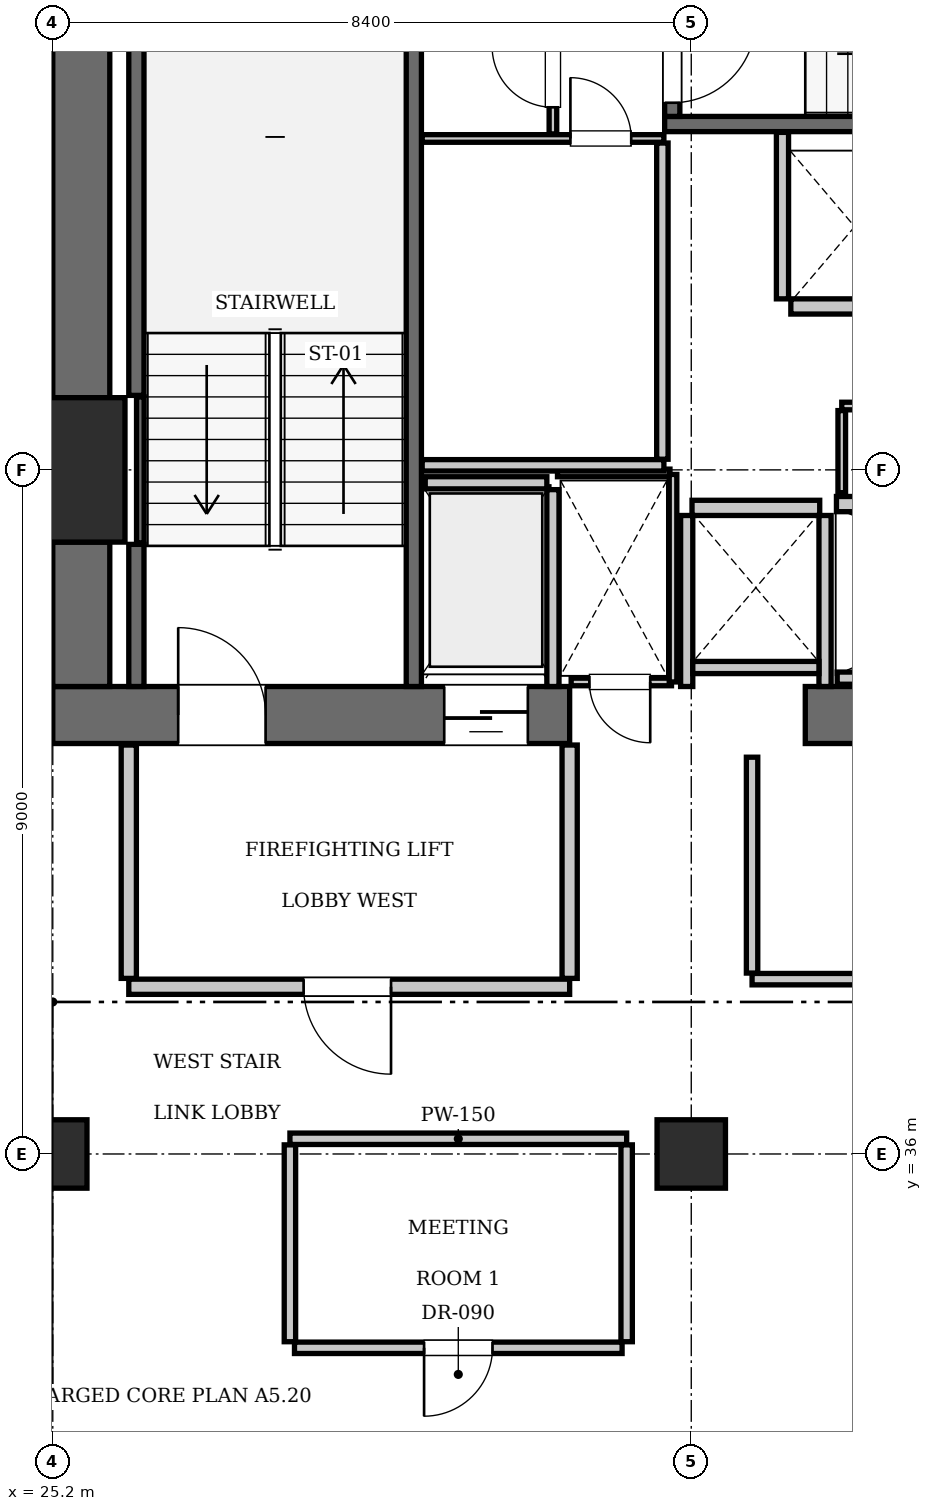
"""IFC4 building model, lengths in metres.
Left out: names, types, materials, properties, quantities, classifications, styles, units other than length and angle.
Written with IfcOpenShell. Run it as: python <this file> out.ifc"""

import sys

from ifc_helpers import new_model, si_unit, direction, frame, frame_2d, origin, origin_2d, place, context, subcontext, project, spatial, rectangle, extrude, element, fill, save


model = new_model("IFC4")
c1 = context("Model", 3, precision=1e-05, world=origin(), true_north=direction((0.0, 1.0)))
c2 = subcontext(c1, "Body", "Model", "MODEL_VIEW")
j1 = project(units=[si_unit("LENGTHUNIT", "METRE"), si_unit("PLANEANGLEUNIT", "RADIAN")], contexts=[c1])
p1 = place(None, origin())
s1 = spatial("IfcSite", under=j1, at=p1, CompositionType="ELEMENT")
p2 = place(p1, origin())
s2 = spatial("IfcBuilding", under=s1, at=p2, CompositionType="ELEMENT")
p3 = place(p2, frame((0.0, 0.0, 173.6)))
s3 = spatial("IfcBuildingStorey", under=s2, at=p3, CompositionType="ELEMENT", Elevation=173.6)
p4 = place(p3, frame((25.2, 45.0, 0.0), z_axis=(0.0, 0.0, 1.0), x_axis=(1.0, 0.0, 0.0)))
e1 = element("IfcColumn", 1, at=p4, inside=s3, PredefinedType="COLUMN", context=c2, shape_type="SweptSolid", body=[
    extrude(rectangle(XDim=1.9, YDim=1.9, at=origin_2d()), origin(), (0.0, 0.0, 1.0), 3.85),
])
p5 = place(p3, frame((25.2, 41.775, 0.0), z_axis=(0.0, 0.0, 1.0), x_axis=(1.0, 0.0, 0.0)))
e2 = element("IfcWall", 2, at=p5, inside=s3, PredefinedType="SHEAR", context=c2, shape_type="SweptSolid", body=[
    extrude(rectangle(XDim=6.8, YDim=0.75, at=frame_2d((3.4, 0.0))), origin(), (0.0, 0.0, 1.0), 3.85),
])
p6 = place(p5, frame((1.65, 0.0, 0.0)))
e3 = element("IfcOpeningElement", 3, at=p6, cuts=e2, PredefinedType="OPENING", context=c2, shape_type="SweptSolid", body=[
    extrude(rectangle(XDim=1.15, YDim=2.15, at=frame_2d((0.575, 1.075))), frame((0.0, 0.385, 0.0), z_axis=(0.0, -1.0, 0.0), x_axis=(1.0, 0.0, 0.0)), (0.0, 0.0, 1.0), 0.77),
])
p7 = place(p5, frame((5.15, 0.0, 0.0)))
e4 = element("IfcOpeningElement", 4, at=p7, cuts=e2, PredefinedType="OPENING", context=c2, shape_type="SweptSolid", body=[
    extrude(rectangle(XDim=1.1, YDim=2.2, at=frame_2d((0.55, 1.1))), frame((0.0, 0.385, 0.0), z_axis=(0.0, -1.0, 0.0), x_axis=(1.0, 0.0, 0.0)), (0.0, 0.0, 1.0), 0.77),
])
p8 = place(p3, frame((35.1, 41.775, 0.0), z_axis=(0.0, 0.0, 1.0), x_axis=(1.0, 0.0, 0.0)))
e5 = element("IfcWall", 5, at=p8, inside=s3, PredefinedType="SHEAR", context=c2, shape_type="SweptSolid", body=[
    extrude(rectangle(XDim=5.4, YDim=0.75, at=frame_2d((2.7, 0.0))), origin(), (0.0, 0.0, 1.0), 3.85),
])
p9 = place(p3, frame((25.575, 42.15, 0.0), z_axis=(0.0, 0.0, 1.0), x_axis=(0.0, 1.0, 0.0)))
e6 = element("IfcWall", 6, at=p9, inside=s3, PredefinedType="SHEAR", context=c2, shape_type="SweptSolid", body=[
    extrude(rectangle(XDim=1.9, YDim=0.75, at=frame_2d((0.95, 0.0))), origin(), (0.0, 0.0, 1.0), 3.85),
])
p10 = place(p3, frame((25.575, 45.95, 0.0), z_axis=(0.0, 0.0, 1.0), x_axis=(0.0, 1.0, 0.0)))
e7 = element("IfcWall", 7, at=p10, inside=s3, PredefinedType="SHEAR", context=c2, shape_type="SweptSolid", body=[
    extrude(rectangle(XDim=7.3, YDim=0.75, at=frame_2d((3.65, 0.0))), origin(), (0.0, 0.0, 1.0), 3.85),
])
for number, where, z_axis, x_axis in (
    (8, (25.2, 36.0, 0.0), (0.0, 0.0, 1.0), (1.0, 0.0, 0.0)),
    (9, (33.6, 36.0, 0.0), (0.0, 0.0, 1.0), (1.0, 0.0, 0.0)),
):
    element("IfcColumn", number, at=place(p3, frame(where, z_axis=z_axis, x_axis=x_axis)), inside=s3, PredefinedType="COLUMN", context=c2, shape_type="SweptSolid", body=[
        extrude(rectangle(XDim=0.9, YDim=0.9, at=origin_2d()), origin(), (0.0, 0.0, 1.0), 3.85),
    ])
p11 = place(p3, frame((29.95, 42.15, 0.0), z_axis=(0.0, 0.0, 1.0), x_axis=(0.0, 1.0, 0.0)))
e10 = element("IfcWall", 10, at=p11, inside=s3, PredefinedType="SOLIDWALL", context=c2, shape_type="SweptSolid", body=[
    extrude(rectangle(XDim=9.0, YDim=0.2, at=frame_2d((4.5, 0.0))), origin(), (0.0, 0.0, 1.0), 3.61),
])
p12 = place(p3, frame((26.3, 42.15, 0.0), z_axis=(0.0, 0.0, 1.0), x_axis=(0.0, 1.0, 0.0)))
e11 = element("IfcWall", 11, at=p12, inside=s3, PredefinedType="SOLIDWALL", context=c2, shape_type="SweptSolid", body=[
    extrude(rectangle(XDim=1.87, YDim=0.2, at=frame_2d((0.935, 0.0))), origin(), (0.0, 0.0, 1.0), 3.61),
])
p13 = place(p3, frame((26.3, 45.98, 0.0), z_axis=(0.0, 0.0, 1.0), x_axis=(0.0, 1.0, 0.0)))
e12 = element("IfcWall", 12, at=p13, inside=s3, PredefinedType="SOLIDWALL", context=c2, shape_type="SweptSolid", body=[
    extrude(rectangle(XDim=5.14, YDim=0.2, at=frame_2d((2.57, 0.0))), origin(), (0.0, 0.0, 1.0), 3.61),
])
p14 = place(p3, frame((26.352, 44.04, 0.0), z_axis=(0.0, 0.0, 1.0), x_axis=(0.0, 1.0, 0.0)))
e13 = element("IfcWall", 13, at=p14, inside=s3, PredefinedType="SOLIDWALL", context=c2, shape_type="SweptSolid", body=[
    extrude(rectangle(XDim=1.92, YDim=0.1, at=frame_2d((0.96, 0.0))), origin(), (0.0, 0.0, 1.0), 3.61),
])
p15 = place(p3, frame((33.25, 49.55, 0.0), z_axis=(0.0, 0.0, 1.0), x_axis=(1.0, 0.0, 0.0)))
e14 = element("IfcWall", 14, at=p15, inside=s3, PredefinedType="SOLIDWALL", context=c2, shape_type="SweptSolid", body=[
    extrude(rectangle(XDim=9.1, YDim=0.2, at=frame_2d((4.55, 0.0))), origin(), (0.0, 0.0, 1.0), 3.61),
])
p16 = place(p3, frame((33.35, 49.65, 0.0), z_axis=(0.0, 0.0, 1.0), x_axis=(0.0, 1.0, 0.0)))
e15 = element("IfcWall", 15, at=p16, inside=s3, PredefinedType="SOLIDWALL", context=c2, shape_type="SweptSolid", body=[
    extrude(rectangle(XDim=3.6, YDim=0.2, at=frame_2d((1.8, 0.0))), origin(), (0.0, 0.0, 1.0), 3.61),
])
p17 = place(p16, frame((0.18, 0.0, 0.0)))
e16 = element("IfcOpeningElement", 16, at=p17, cuts=e15, PredefinedType="OPENING", context=c2, shape_type="SweptSolid", body=[
    extrude(rectangle(XDim=1.1, YDim=2.15, at=frame_2d((0.55, 1.075))), frame((0.0, 0.11, 0.0), z_axis=(0.0, -1.0, 0.0), x_axis=(1.0, 0.0, 0.0)), (0.0, 0.0, 1.0), 0.22),
])
p18 = place(p3, frame((35.51, 44.55, 0.0), z_axis=(0.0, 0.0, 1.0), x_axis=(1.0, 0.0, 0.0)))
e17 = element("IfcWall", 17, at=p18, inside=s3, PredefinedType="SOLIDWALL", context=c2, shape_type="SweptSolid", body=[
    extrude(rectangle(XDim=1.68, YDim=0.2, at=frame_2d((0.84, 0.0))), origin(), (0.0, 0.0, 1.0), 3.61),
])
p19 = place(p3, frame((34.91, 47.15, 0.0), z_axis=(0.0, 0.0, 1.0), x_axis=(1.0, 0.0, 0.0)))
e18 = element("IfcWall", 18, at=p19, inside=s3, PredefinedType="SOLIDWALL", context=c2, shape_type="SweptSolid", body=[
    extrude(rectangle(XDim=1.68, YDim=0.2, at=frame_2d((0.84, 0.0))), origin(), (0.0, 0.0, 1.0), 3.61),
])
p20 = place(p3, frame((33.61, 44.5, 0.0), z_axis=(0.0, 0.0, 1.0), x_axis=(1.0, 0.0, 0.0)))
e19 = element("IfcWall", 19, at=p20, inside=s3, PredefinedType="SOLIDWALL", context=c2, shape_type="SweptSolid", body=[
    extrude(rectangle(XDim=1.68, YDim=0.2, at=frame_2d((0.84, 0.0))), origin(), (0.0, 0.0, 1.0), 3.61),
])
p21 = place(p3, frame((30.1, 44.83, 0.0), z_axis=(0.0, 0.0, 1.0), x_axis=(1.0, 0.0, 0.0)))
e20 = element("IfcWall", 20, at=p21, inside=s3, PredefinedType="SOLIDWALL", context=c2, shape_type="SweptSolid", body=[
    extrude(rectangle(XDim=1.6, YDim=0.16, at=frame_2d((0.8, 0.0))), origin(), (0.0, 0.0, 1.0), 3.61),
])
p22 = place(p3, frame((31.78, 42.15, 0.0), z_axis=(0.0, 0.0, 1.0), x_axis=(0.0, 1.0, 0.0)))
e21 = element("IfcWall", 21, at=p22, inside=s3, PredefinedType="SOLIDWALL", context=c2, shape_type="SweptSolid", body=[
    extrude(rectangle(XDim=2.59, YDim=0.16, at=frame_2d((1.295, 0.0))), origin(), (0.0, 0.0, 1.0), 3.61),
])
p23 = place(p3, frame((35.52, 42.26, 0.0), z_axis=(0.0, 0.0, 1.0), x_axis=(1.0, 0.0, 0.0)))
e22 = element("IfcWall", 22, at=p23, inside=s3, PredefinedType="SOLIDWALL", context=c2, shape_type="SweptSolid", body=[
    extrude(rectangle(XDim=5.02, YDim=0.16, at=frame_2d((2.51, 0.0))), origin(), (0.0, 0.0, 1.0), 3.61),
])
p24 = place(p3, frame((34.8, 47.25, 0.0), z_axis=(0.0, 0.0, 1.0), x_axis=(0.0, 1.0, 0.0)))
e23 = element("IfcWall", 23, at=p24, inside=s3, PredefinedType="SOLIDWALL", context=c2, shape_type="SweptSolid", body=[
    extrude(rectangle(XDim=2.19, YDim=0.16, at=frame_2d((1.095, 0.0))), origin(), (0.0, 0.0, 1.0), 3.61),
])
for number, where, z_axis, x_axis in (
    (24, (33.54, 42.15, 0.0), (0.0, 0.0, 1.0), (0.0, 1.0, 0.0)),
    (25, (35.36, 42.15, 0.0), (0.0, 0.0, 1.0), (0.0, 1.0, 0.0)),
):
    element("IfcWall", number, at=place(p3, frame(where, z_axis=z_axis, x_axis=x_axis)), inside=s3, PredefinedType="SOLIDWALL", context=c2, shape_type="SweptSolid", body=[
        extrude(rectangle(XDim=2.25, YDim=0.16, at=frame_2d((1.125, 0.0))), origin(), (0.0, 0.0, 1.0), 3.61),
    ])
p25 = place(p3, frame((33.62, 42.4, 0.0), z_axis=(0.0, 0.0, 1.0), x_axis=(1.0, 0.0, 0.0)))
e26 = element("IfcWall", 26, at=p25, inside=s3, PredefinedType="SOLIDWALL", context=c2, shape_type="SweptSolid", body=[
    extrude(rectangle(XDim=1.66, YDim=0.16, at=frame_2d((0.83, 0.0))), origin(), (0.0, 0.0, 1.0), 3.61),
])
p26 = place(p3, frame((26.2, 38.2, 0.0), z_axis=(0.0, 0.0, 1.0), x_axis=(1.0, 0.0, 0.0)))
e27 = element("IfcWall", 27, at=p26, inside=s3, PredefinedType="PARTITIONING", context=c2, shape_type="SweptSolid", body=[
    extrude(rectangle(XDim=5.8, YDim=0.2, at=frame_2d((2.9, 0.0))), origin(), (0.0, 0.0, 1.0), 3.61),
])
p27 = place(p26, frame((2.3, 0.0, 0.0)))
e28 = element("IfcOpeningElement", 28, at=p27, cuts=e27, PredefinedType="OPENING", context=c2, shape_type="SweptSolid", body=[
    extrude(rectangle(XDim=1.15, YDim=2.15, at=frame_2d((0.575, 1.075))), frame((0.0, 0.11, 0.0), z_axis=(0.0, -1.0, 0.0), x_axis=(1.0, 0.0, 0.0)), (0.0, 0.0, 1.0), 0.22),
])
for number, where, z_axis, x_axis in (
    (29, (26.2, 38.31, 0.0), (0.0, 0.0, 1.0), (0.0, 1.0, 0.0)),
    (30, (32.0, 38.31, 0.0), (0.0, 0.0, 1.0), (0.0, 1.0, 0.0)),
):
    element("IfcWall", number, at=place(p3, frame(where, z_axis=z_axis, x_axis=x_axis)), inside=s3, PredefinedType="PARTITIONING", context=c2, shape_type="SweptSolid", body=[
        extrude(rectangle(XDim=3.07, YDim=0.2, at=frame_2d((1.535, 0.0))), origin(), (0.0, 0.0, 1.0), 3.61),
    ])
p28 = place(p3, frame((32.02, 42.21, 0.0), z_axis=(0.0, 0.0, 1.0), x_axis=(1.0, 0.0, 0.0)))
e31 = element("IfcWall", 31, at=p28, inside=s3, PredefinedType="PARTITIONING", context=c2, shape_type="SweptSolid", body=[
    extrude(rectangle(XDim=1.32, YDim=0.1, at=frame_2d((0.66, 0.0))), origin(), (0.0, 0.0, 1.0), 3.61),
])
p29 = place(p28, frame((0.24, 0.0, 0.0)))
e32 = element("IfcOpeningElement", 32, at=p29, cuts=e31, PredefinedType="OPENING", context=c2, shape_type="SweptSolid", body=[
    extrude(rectangle(XDim=0.8, YDim=2.05, at=frame_2d((0.4, 1.025))), frame((0.0, 0.06, 0.0), z_axis=(0.0, -1.0, 0.0), x_axis=(1.0, 0.0, 0.0)), (0.0, 0.0, 1.0), 0.12),
])
p30 = place(p3, frame((31.84, 44.96, 0.0), z_axis=(0.0, 0.0, 1.0), x_axis=(1.0, 0.0, 0.0)))
e33 = element("IfcWall", 33, at=p30, inside=s3, PredefinedType="PARTITIONING", context=c2, shape_type="SweptSolid", body=[
    extrude(rectangle(XDim=1.48, YDim=0.1, at=frame_2d((0.74, 0.0))), origin(), (0.0, 0.0, 1.0), 3.61),
])
p31 = place(p3, frame((33.36, 42.21, 0.0), z_axis=(0.0, 0.0, 1.0), x_axis=(0.0, 1.0, 0.0)))
e34 = element("IfcWall", 34, at=p31, inside=s3, PredefinedType="PARTITIONING", context=c2, shape_type="SweptSolid", body=[
    extrude(rectangle(XDim=2.73, YDim=0.1, at=frame_2d((1.365, 0.0))), origin(), (0.0, 0.0, 1.0), 3.61),
])
p32 = place(p3, frame((35.58, 45.84, 0.0), z_axis=(0.0, 0.0, 1.0), x_axis=(1.0, 0.0, 0.0)))
e35 = element("IfcWall", 35, at=p32, inside=s3, PredefinedType="PARTITIONING", context=c2, shape_type="SweptSolid", body=[
    extrude(rectangle(XDim=4.94, YDim=0.1, at=frame_2d((2.47, 0.0))), origin(), (0.0, 0.0, 1.0), 3.61),
])
p33 = place(p32, frame((1.8, 0.0, 0.0)))
e36 = element("IfcOpeningElement", 36, at=p33, cuts=e35, PredefinedType="OPENING", context=c2, shape_type="SweptSolid", body=[
    extrude(rectangle(XDim=0.8, YDim=2.05, at=frame_2d((0.4, 1.025))), frame((0.0, 0.06, 0.0), z_axis=(0.0, -1.0, 0.0), x_axis=(1.0, 0.0, 0.0)), (0.0, 0.0, 1.0), 0.12),
])
p34 = place(p3, frame((35.58, 44.7, 0.0), z_axis=(0.0, 0.0, 1.0), x_axis=(0.0, 1.0, 0.0)))
e37 = element("IfcWall", 37, at=p34, inside=s3, PredefinedType="PARTITIONING", context=c2, shape_type="SweptSolid", body=[
    extrude(rectangle(XDim=1.08, YDim=0.1, at=frame_2d((0.54, 0.0))), origin(), (0.0, 0.0, 1.0), 3.61),
])
p35 = place(p3, frame((30.06, 45.06, 0.0), z_axis=(0.0, 0.0, 1.0), x_axis=(1.0, 0.0, 0.0)))
e38 = element("IfcWall", 38, at=p35, inside=s3, PredefinedType="PARTITIONING", context=c2, shape_type="SweptSolid", body=[
    extrude(rectangle(XDim=3.18, YDim=0.15, at=frame_2d((1.59, 0.0))), origin(), (0.0, 0.0, 1.0), 3.61),
])
p36 = place(p3, frame((33.22, 45.14, 0.0), z_axis=(0.0, 0.0, 1.0), x_axis=(0.0, 1.0, 0.0)))
e39 = element("IfcWall", 39, at=p36, inside=s3, PredefinedType="PARTITIONING", context=c2, shape_type="SweptSolid", body=[
    extrude(rectangle(XDim=4.16, YDim=0.15, at=frame_2d((2.08, 0.0))), origin(), (0.0, 0.0, 1.0), 3.61),
])
p37 = place(p3, frame((30.06, 49.36, 0.0), z_axis=(0.0, 0.0, 1.0), x_axis=(1.0, 0.0, 0.0)))
e40 = element("IfcWall", 40, at=p37, inside=s3, PredefinedType="PARTITIONING", context=c2, shape_type="SweptSolid", body=[
    extrude(rectangle(XDim=3.18, YDim=0.1, at=frame_2d((1.59, 0.0))), origin(), (0.0, 0.0, 1.0), 3.61),
])
p38 = place(p37, frame((1.95, 0.0, 0.0)))
e41 = element("IfcOpeningElement", 41, at=p38, cuts=e40, PredefinedType="OPENING", context=c2, shape_type="SweptSolid", body=[
    extrude(rectangle(XDim=0.8, YDim=2.05, at=frame_2d((0.4, 1.025))), frame((0.0, 0.06, 0.0), z_axis=(0.0, -1.0, 0.0), x_axis=(1.0, 0.0, 0.0)), (0.0, 0.0, 1.0), 0.12),
])
p39 = place(p3, frame((31.78, 49.42, 0.0), z_axis=(0.0, 0.0, 1.0), x_axis=(0.0, 1.0, 0.0)))
e42 = element("IfcWall", 42, at=p39, inside=s3, PredefinedType="PARTITIONING", context=c2, shape_type="SweptSolid", body=[
    extrude(rectangle(XDim=1.68, YDim=0.1, at=frame_2d((0.84, 0.0))), origin(), (0.0, 0.0, 1.0), 3.61),
])
p40 = place(p39, frame((0.35, 0.0, 0.0)))
e43 = element("IfcOpeningElement", 43, at=p40, cuts=e42, PredefinedType="OPENING", context=c2, shape_type="SweptSolid", body=[
    extrude(rectangle(XDim=0.8, YDim=2.05, at=frame_2d((0.4, 1.025))), frame((0.0, 0.06, 0.0), z_axis=(0.0, -1.0, 0.0), x_axis=(1.0, 0.0, 0.0)), (0.0, 0.0, 1.0), 0.12),
])
p41 = place(p3, frame((34.4, 38.3, 0.0), z_axis=(0.0, 0.0, 1.0), x_axis=(1.0, 0.0, 0.0)))
e44 = element("IfcWall", 44, at=p41, inside=s3, PredefinedType="PARTITIONING", context=c2, shape_type="SweptSolid", body=[
    extrude(rectangle(XDim=5.92, YDim=0.15, at=frame_2d((2.96, 0.0))), origin(), (0.0, 0.0, 1.0), 3.61),
])
p42 = place(p41, frame((2.4, 0.0, 0.0)))
e45 = element("IfcOpeningElement", 45, at=p42, cuts=e44, PredefinedType="OPENING", context=c2, shape_type="SweptSolid", body=[
    extrude(rectangle(XDim=0.9, YDim=2.1, at=frame_2d((0.45, 1.05))), frame((0.0, 0.085, 0.0), z_axis=(0.0, -1.0, 0.0), x_axis=(1.0, 0.0, 0.0)), (0.0, 0.0, 1.0), 0.17),
])
p43 = place(p3, frame((34.4, 38.38, 0.0), z_axis=(0.0, 0.0, 1.0), x_axis=(0.0, 1.0, 0.0)))
e46 = element("IfcWall", 46, at=p43, inside=s3, PredefinedType="PARTITIONING", context=c2, shape_type="SweptSolid", body=[
    extrude(rectangle(XDim=2.84, YDim=0.15, at=frame_2d((1.42, 0.0))), origin(), (0.0, 0.0, 1.0), 3.61),
])
p44 = place(p3, frame((28.32, 36.2, 0.0), z_axis=(0.0, 0.0, 1.0), x_axis=(1.0, 0.0, 0.0)))
e47 = element("IfcWall", 47, at=p44, inside=s3, PredefinedType="PARTITIONING", context=c2, shape_type="SweptSolid", body=[
    extrude(rectangle(XDim=4.43, YDim=0.15, at=frame_2d((2.215, 0.0))), origin(), (0.0, 0.0, 1.0), 3.61),
])
for number, where, z_axis, x_axis in (
    (48, (28.32, 33.53, 0.0), (0.0, 0.0, 1.0), (0.0, 1.0, 0.0)),
    (49, (32.75, 33.53, 0.0), (0.0, 0.0, 1.0), (0.0, 1.0, 0.0)),
):
    element("IfcWall", number, at=place(p3, frame(where, z_axis=z_axis, x_axis=x_axis)), inside=s3, PredefinedType="PARTITIONING", context=c2, shape_type="SweptSolid", body=[
        extrude(rectangle(XDim=2.59, YDim=0.15, at=frame_2d((1.295, 0.0))), origin(), (0.0, 0.0, 1.0), 3.61),
    ])
p45 = place(p3, frame((28.38, 33.45, 0.0), z_axis=(0.0, 0.0, 1.0), x_axis=(1.0, 0.0, 0.0)))
e50 = element("IfcWall", 50, at=p45, inside=s3, PredefinedType="PARTITIONING", context=c2, shape_type="SweptSolid", body=[
    extrude(rectangle(XDim=4.31, YDim=0.15, at=frame_2d((2.155, 0.0))), origin(), (0.0, 0.0, 1.0), 3.61),
])
p46 = place(p45, frame((1.705, 0.0, 0.0)))
e51 = element("IfcOpeningElement", 51, at=p46, cuts=e50, PredefinedType="OPENING", context=c2, shape_type="SweptSolid", body=[
    extrude(rectangle(XDim=0.9, YDim=2.1, at=frame_2d((0.45, 1.05))), frame((0.0, 0.085, 0.0), z_axis=(0.0, -1.0, 0.0), x_axis=(1.0, 0.0, 0.0)), (0.0, 0.0, 1.0), 0.17),
])
p47 = place(p6, origin())
e52 = element("IfcDoor", 52, at=p47, inside=s3, OperationType="SINGLE_SWING_LEFT", PredefinedType="DOOR", context=c2, shape_type="SweptSolid", body=[
    extrude(rectangle(XDim=1.15, YDim=2.15, at=frame_2d((0.575, 1.075))), frame((0.0, 0.025, 0.0), z_axis=(0.0, -1.0, 0.0), x_axis=(1.0, 0.0, 0.0)), (0.0, 0.0, 1.0), 0.05),
])
fill(e3, e52)
p48 = place(p17, frame((1.1, 0.0, 0.0), z_axis=(0.0, 0.0, 1.0), x_axis=(-1.0, 0.0, 0.0)))
e53 = element("IfcDoor", 53, at=p48, inside=s3, OperationType="SINGLE_SWING_LEFT", PredefinedType="DOOR", context=c2, shape_type="SweptSolid", body=[
    extrude(rectangle(XDim=1.1, YDim=2.15, at=frame_2d((0.55, 1.075))), frame((0.0, 0.025, 0.0), z_axis=(0.0, -1.0, 0.0), x_axis=(1.0, 0.0, 0.0)), (0.0, 0.0, 1.0), 0.05),
])
fill(e16, e53)
p49 = place(p7, frame((1.1, 0.0, 0.0), z_axis=(0.0, 0.0, 1.0), x_axis=(-1.0, 0.0, 0.0)))
e54 = element("IfcDoor", 54, at=p49, inside=s3, OperationType="SLIDING_TO_LEFT", PredefinedType="DOOR", context=c2, shape_type="SweptSolid", body=[
    extrude(rectangle(XDim=1.1, YDim=2.2, at=frame_2d((0.55, 1.1))), frame((0.0, 0.025, 0.0), z_axis=(0.0, -1.0, 0.0), x_axis=(1.0, 0.0, 0.0)), (0.0, 0.0, 1.0), 0.05),
])
fill(e4, e54)
p50 = place(p27, frame((1.15, 0.0, 0.0), z_axis=(0.0, 0.0, 1.0), x_axis=(-1.0, 0.0, 0.0)))
e55 = element("IfcDoor", 55, at=p50, inside=s3, OperationType="SINGLE_SWING_LEFT", PredefinedType="DOOR", context=c2, shape_type="SweptSolid", body=[
    extrude(rectangle(XDim=1.15, YDim=2.15, at=frame_2d((0.575, 1.075))), frame((0.0, 0.025, 0.0), z_axis=(0.0, -1.0, 0.0), x_axis=(1.0, 0.0, 0.0)), (0.0, 0.0, 1.0), 0.05),
])
fill(e28, e55)
p51 = place(p29, frame((0.8, 0.0, 0.0), z_axis=(0.0, 0.0, 1.0), x_axis=(-1.0, 0.0, 0.0)))
e56 = element("IfcDoor", 56, at=p51, inside=s3, OperationType="SINGLE_SWING_LEFT", PredefinedType="DOOR", context=c2, shape_type="SweptSolid", body=[
    extrude(rectangle(XDim=0.8, YDim=2.05, at=frame_2d((0.4, 1.025))), frame((0.0, 0.025, 0.0), z_axis=(0.0, -1.0, 0.0), x_axis=(1.0, 0.0, 0.0)), (0.0, 0.0, 1.0), 0.05),
])
fill(e32, e56)
p52 = place(p38, origin())
e57 = element("IfcDoor", 57, at=p52, inside=s3, OperationType="SINGLE_SWING_LEFT", PredefinedType="DOOR", context=c2, shape_type="SweptSolid", body=[
    extrude(rectangle(XDim=0.8, YDim=2.05, at=frame_2d((0.4, 1.025))), frame((0.0, 0.025, 0.0), z_axis=(0.0, -1.0, 0.0), x_axis=(1.0, 0.0, 0.0)), (0.0, 0.0, 1.0), 0.05),
])
fill(e41, e57)
p53 = place(p40, origin())
e58 = element("IfcDoor", 58, at=p53, inside=s3, OperationType="SINGLE_SWING_RIGHT", PredefinedType="DOOR", context=c2, shape_type="SweptSolid", body=[
    extrude(rectangle(XDim=0.8, YDim=2.05, at=frame_2d((0.4, 1.025))), frame((0.0, 0.025, 0.0), z_axis=(0.0, -1.0, 0.0), x_axis=(1.0, 0.0, 0.0)), (0.0, 0.0, 1.0), 0.05),
])
fill(e43, e58)
p54 = place(p46, frame((0.9, 0.0, 0.0), z_axis=(0.0, 0.0, 1.0), x_axis=(-1.0, 0.0, 0.0)))
e59 = element("IfcDoor", 59, at=p54, inside=s3, OperationType="SINGLE_SWING_RIGHT", PredefinedType="DOOR", context=c2, shape_type="SweptSolid", body=[
    extrude(rectangle(XDim=0.9, YDim=2.1, at=frame_2d((0.45, 1.05))), frame((0.0, 0.025, 0.0), z_axis=(0.0, -1.0, 0.0), x_axis=(1.0, 0.0, 0.0)), (0.0, 0.0, 1.0), 0.05),
])
fill(e51, e59)
save(model, sys.argv[1])
